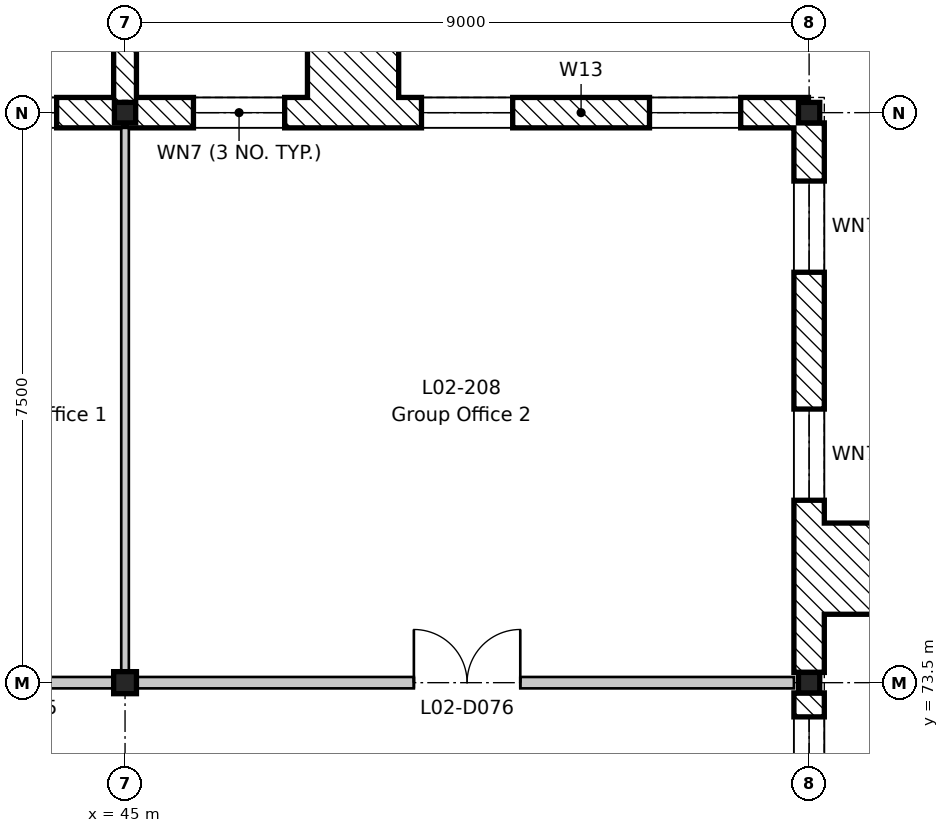
"""IFC4 building model, lengths in metres.
Left out: names, types, materials, properties, quantities, classifications, styles, units other than length and angle.
Written with IfcOpenShell. Run it as: python <this file> out.ifc"""

import sys

from ifc_helpers import new_model, si_unit, direction, frame, frame_2d, origin, origin_2d, place, context, subcontext, project, spatial, rectangle, i_section, extrude, element, fill, save


model = new_model("IFC4")
c1 = context("Model", 3, precision=1e-05, world=origin(), true_north=direction((0.0, 1.0)))
c2 = subcontext(c1, "Body", "Model", "MODEL_VIEW")
j1 = project(units=[si_unit("LENGTHUNIT", "METRE"), si_unit("PLANEANGLEUNIT", "RADIAN")], contexts=[c1])
p1 = place(None, origin())
s1 = spatial("IfcSite", under=j1, at=p1, CompositionType="ELEMENT")
p2 = place(p1, origin())
s2 = spatial("IfcBuilding", under=s1, at=p2, CompositionType="ELEMENT")
p3 = place(p2, frame((0.0, 0.0, 9.9)))
s3 = spatial("IfcBuildingStorey", under=s2, at=p3, CompositionType="ELEMENT", Elevation=9.9)
p4 = place(p3, frame((45.0, 73.5, -0.2), z_axis=(0.0, 0.0, 1.0), x_axis=(1.0, 0.0, 0.0)))
e1 = element("IfcColumn", 1, at=p4, inside=s3, PredefinedType="COLUMN", context=c2, shape_type="SweptSolid", body=[
    extrude(i_section(OverallWidth=0.3, OverallDepth=0.29, WebThickness=0.009, FlangeThickness=0.014, FilletRadius=0.027, at=origin_2d()), origin(), (0.0, 0.0, 1.0), 4.5),
])
for number, where, z_axis, x_axis in (
    (2, (45.0, 81.0, -0.2), (0.0, 0.0, 1.0), (1.0, 0.0, 0.0)),
    (3, (54.0, 73.5, -0.2), (0.0, 0.0, 1.0), (1.0, 0.0, 0.0)),
    (4, (54.0, 81.0, -0.2), (0.0, 0.0, 1.0), (1.0, 0.0, 0.0)),
):
    element("IfcColumn", number, at=place(p3, frame(where, z_axis=z_axis, x_axis=x_axis)), inside=s3, PredefinedType="COLUMN", context=c2, shape_type="SweptSolid", body=[
        extrude(i_section(OverallWidth=0.28, OverallDepth=0.27, WebThickness=0.008, FlangeThickness=0.013, FilletRadius=0.024, at=origin_2d()), origin(), (0.0, 0.0, 1.0), 4.5),
    ])
p5 = place(p3, frame((36.009, 81.0, 0.0), z_axis=(0.0, 0.0, 1.0), x_axis=(1.0, 0.0, 0.0)))
e5 = element("IfcWall", 5, at=p5, inside=s3, PredefinedType="STANDARD", context=c2, shape_type="SweptSolid", body=[
    extrude(rectangle(XDim=8.982, YDim=0.4, at=frame_2d((4.491, 0.0))), origin(), (0.0, 0.0, 1.0), 3.9),
])
p6 = place(p5, frame((3.591, 0.0, 0.0)))
e6 = element("IfcOpeningElement", 6, at=p6, cuts=e5, PredefinedType="OPENING", context=c2, shape_type="SweptSolid", body=[
    extrude(rectangle(XDim=1.8, YDim=2.4, at=frame_2d((0.9, 1.2))), frame((0.0, 0.21, 0.0), z_axis=(0.0, -1.0, 0.0), x_axis=(1.0, 0.0, 0.0)), (0.0, 0.0, 1.0), 0.42),
])
p7 = place(p5, frame((0.891, 0.0, 0.9)))
e7 = element("IfcOpeningElement", 7, at=p7, cuts=e5, PredefinedType="OPENING", context=c2, shape_type="SweptSolid", body=[
    extrude(rectangle(XDim=1.2, YDim=2.4, at=frame_2d((0.6, 1.2))), frame((0.0, 0.21, 0.0), z_axis=(0.0, -1.0, 0.0), x_axis=(1.0, 0.0, 0.0)), (0.0, 0.0, 1.0), 0.42),
])
p8 = place(p5, frame((6.891, 0.0, 0.9)))
e8 = element("IfcOpeningElement", 8, at=p8, cuts=e5, PredefinedType="OPENING", context=c2, shape_type="SweptSolid", body=[
    extrude(rectangle(XDim=1.2, YDim=2.4, at=frame_2d((0.6, 1.2))), frame((0.0, 0.21, 0.0), z_axis=(0.0, -1.0, 0.0), x_axis=(1.0, 0.0, 0.0)), (0.0, 0.0, 1.0), 0.42),
])
p9 = place(p3, frame((45.009, 81.0, 0.0), z_axis=(0.0, 0.0, 1.0), x_axis=(1.0, 0.0, 0.0)))
e9 = element("IfcWall", 9, at=p9, inside=s3, PredefinedType="STANDARD", context=c2, shape_type="SweptSolid", body=[
    extrude(rectangle(XDim=8.982, YDim=0.4, at=frame_2d((4.491, 0.0))), origin(), (0.0, 0.0, 1.0), 3.9),
])
p10 = place(p9, frame((0.891, 0.0, 0.9)))
e10 = element("IfcOpeningElement", 10, at=p10, cuts=e9, PredefinedType="OPENING", context=c2, shape_type="SweptSolid", body=[
    extrude(rectangle(XDim=1.2, YDim=2.4, at=frame_2d((0.6, 1.2))), frame((0.0, 0.21, 0.0), z_axis=(0.0, -1.0, 0.0), x_axis=(1.0, 0.0, 0.0)), (0.0, 0.0, 1.0), 0.42),
])
p11 = place(p9, frame((3.891, 0.0, 0.9)))
e11 = element("IfcOpeningElement", 11, at=p11, cuts=e9, PredefinedType="OPENING", context=c2, shape_type="SweptSolid", body=[
    extrude(rectangle(XDim=1.2, YDim=2.4, at=frame_2d((0.6, 1.2))), frame((0.0, 0.21, 0.0), z_axis=(0.0, -1.0, 0.0), x_axis=(1.0, 0.0, 0.0)), (0.0, 0.0, 1.0), 0.42),
])
p12 = place(p9, frame((6.891, 0.0, 0.9)))
e12 = element("IfcOpeningElement", 12, at=p12, cuts=e9, PredefinedType="OPENING", context=c2, shape_type="SweptSolid", body=[
    extrude(rectangle(XDim=1.2, YDim=2.4, at=frame_2d((0.6, 1.2))), frame((0.0, 0.21, 0.0), z_axis=(0.0, -1.0, 0.0), x_axis=(1.0, 0.0, 0.0)), (0.0, 0.0, 1.0), 0.42),
])
p13 = place(p3, frame((54.0, 73.365, 0.0), z_axis=(0.0, 0.0, 1.0), x_axis=(0.0, -1.0, 0.0)))
e13 = element("IfcWall", 13, at=p13, inside=s3, PredefinedType="STANDARD", context=c2, shape_type="SweptSolid", body=[
    extrude(rectangle(XDim=2.73, YDim=0.4, at=frame_2d((1.365, 0.0))), origin(), (0.0, 0.0, 1.0), 4.1),
])
p14 = place(p13, frame((0.315, 0.0, 0.9)))
e14 = element("IfcOpeningElement", 14, at=p14, cuts=e13, PredefinedType="OPENING", context=c2, shape_type="SweptSolid", body=[
    extrude(rectangle(XDim=2.1, YDim=2.1, at=frame_2d((1.05, 1.05))), frame((0.0, 0.21, 0.0), z_axis=(0.0, -1.0, 0.0), x_axis=(1.0, 0.0, 0.0)), (0.0, 0.0, 1.0), 0.42),
])
p15 = place(p3, frame((54.0, 80.865, 0.0), z_axis=(0.0, 0.0, 1.0), x_axis=(0.0, -1.0, 0.0)))
e15 = element("IfcWall", 15, at=p15, inside=s3, PredefinedType="STANDARD", context=c2, shape_type="SweptSolid", body=[
    extrude(rectangle(XDim=7.23, YDim=0.4, at=frame_2d((3.615, 0.0))), origin(), (0.0, 0.0, 1.0), 3.97),
])
p16 = place(p15, frame((3.765, 0.0, 0.9)))
e16 = element("IfcOpeningElement", 16, at=p16, cuts=e15, PredefinedType="OPENING", context=c2, shape_type="SweptSolid", body=[
    extrude(rectangle(XDim=1.2, YDim=2.4, at=frame_2d((0.6, 1.2))), frame((0.0, 0.21, 0.0), z_axis=(0.0, -1.0, 0.0), x_axis=(1.0, 0.0, 0.0)), (0.0, 0.0, 1.0), 0.42),
])
p17 = place(p15, frame((0.765, 0.0, 0.9)))
e17 = element("IfcOpeningElement", 17, at=p17, cuts=e15, PredefinedType="OPENING", context=c2, shape_type="SweptSolid", body=[
    extrude(rectangle(XDim=1.2, YDim=2.4, at=frame_2d((0.6, 1.2))), frame((0.0, 0.21, 0.0), z_axis=(0.0, -1.0, 0.0), x_axis=(1.0, 0.0, 0.0)), (0.0, 0.0, 1.0), 0.42),
])
for number, where, z_axis, x_axis in (
    (18, (47.4, 81.8, 0.0), (0.0, 0.0, 1.0), (1.0, 0.0, 0.0)),
    (19, (54.8, 74.4, 0.0), (0.0, 0.0, 1.0), (0.0, 1.0, 0.0)),
):
    element("IfcWall", number, at=place(p3, frame(where, z_axis=z_axis, x_axis=x_axis)), inside=s3, PredefinedType="STANDARD", context=c2, shape_type="SweptSolid", body=[
        extrude(rectangle(XDim=1.2, YDim=1.2, at=frame_2d((0.6, 0.0))), origin(), (0.0, 0.0, 1.0), 4.5),
    ])
p18 = place(p3, frame((45.0, 81.135, 0.0), z_axis=(0.0, 0.0, 1.0), x_axis=(0.0, 1.0, 0.0)))
e20 = element("IfcWall", 20, at=p18, inside=s3, PredefinedType="STANDARD", context=c2, shape_type="SweptSolid", body=[
    extrude(rectangle(XDim=2.865, YDim=0.3, at=frame_2d((1.433, 0.0))), origin(), (0.0, 0.0, 1.0), 3.97),
])
p19 = place(p3, frame((45.0, 73.575, 0.0), z_axis=(0.0, 0.0, 1.0), x_axis=(0.0, 1.0, 0.0)))
e21 = element("IfcWall", 21, at=p19, inside=s3, PredefinedType="PARTITIONING", context=c2, shape_type="SweptSolid", body=[
    extrude(rectangle(XDim=7.225, YDim=0.1, at=frame_2d((3.613, 0.0))), origin(), (0.0, 0.0, 1.0), 3.95),
])
p20 = place(p3, frame((18.0, 73.5, 0.0), z_axis=(0.0, 0.0, 1.0), x_axis=(1.0, 0.0, 0.0)))
e22 = element("IfcWall", 22, at=p20, inside=s3, PredefinedType="PARTITIONING", context=c2, shape_type="SweptSolid", body=[
    extrude(rectangle(XDim=35.8, YDim=0.15, at=frame_2d((17.9, 0.0))), origin(), (0.0, 0.0, 1.0), 3.78),
])
p21 = place(p20, frame((7.05, 0.0, 0.0)))
e23 = element("IfcOpeningElement", 23, at=p21, cuts=e22, PredefinedType="OPENING", context=c2, shape_type="SweptSolid", body=[
    extrude(rectangle(XDim=1.4, YDim=2.1, at=frame_2d((0.7, 1.05))), frame((0.0, 0.085, 0.0), z_axis=(0.0, -1.0, 0.0), x_axis=(1.0, 0.0, 0.0)), (0.0, 0.0, 1.0), 0.17),
])
p22 = place(p20, frame((10.0, 0.0, 0.0)))
e24 = element("IfcOpeningElement", 24, at=p22, cuts=e22, PredefinedType="OPENING", context=c2, shape_type="SweptSolid", body=[
    extrude(rectangle(XDim=1.0, YDim=2.1, at=frame_2d((0.5, 1.05))), frame((0.0, 0.085, 0.0), z_axis=(0.0, -1.0, 0.0), x_axis=(1.0, 0.0, 0.0)), (0.0, 0.0, 1.0), 0.17),
])
p23 = place(p20, frame((14.5, 0.0, 0.0)))
e25 = element("IfcOpeningElement", 25, at=p23, cuts=e22, PredefinedType="OPENING", context=c2, shape_type="SweptSolid", body=[
    extrude(rectangle(XDim=1.0, YDim=2.1, at=frame_2d((0.5, 1.05))), frame((0.0, 0.085, 0.0), z_axis=(0.0, -1.0, 0.0), x_axis=(1.0, 0.0, 0.0)), (0.0, 0.0, 1.0), 0.17),
])
p24 = place(p20, frame((20.5, 0.0, 0.0)))
e26 = element("IfcOpeningElement", 26, at=p24, cuts=e22, PredefinedType="OPENING", context=c2, shape_type="SweptSolid", body=[
    extrude(rectangle(XDim=1.0, YDim=2.1, at=frame_2d((0.5, 1.05))), frame((0.0, 0.085, 0.0), z_axis=(0.0, -1.0, 0.0), x_axis=(1.0, 0.0, 0.0)), (0.0, 0.0, 1.0), 0.17),
])
p25 = place(p20, frame((25.0, 0.0, 0.0)))
e27 = element("IfcOpeningElement", 27, at=p25, cuts=e22, PredefinedType="OPENING", context=c2, shape_type="SweptSolid", body=[
    extrude(rectangle(XDim=1.0, YDim=2.1, at=frame_2d((0.5, 1.05))), frame((0.0, 0.085, 0.0), z_axis=(0.0, -1.0, 0.0), x_axis=(1.0, 0.0, 0.0)), (0.0, 0.0, 1.0), 0.17),
])
p26 = place(p20, frame((30.8, 0.0, 0.0)))
e28 = element("IfcOpeningElement", 28, at=p26, cuts=e22, PredefinedType="OPENING", context=c2, shape_type="SweptSolid", body=[
    extrude(rectangle(XDim=1.4, YDim=2.1, at=frame_2d((0.7, 1.05))), frame((0.0, 0.085, 0.0), z_axis=(0.0, -1.0, 0.0), x_axis=(1.0, 0.0, 0.0)), (0.0, 0.0, 1.0), 0.17),
])
p27 = place(p8, origin())
e29 = element("IfcWindow", 29, at=p27, inside=s3, PartitioningType="SINGLE_PANEL", PredefinedType="WINDOW", context=c2, shape_type="SweptSolid", body=[
    extrude(rectangle(XDim=1.2, YDim=2.4, at=frame_2d((0.6, 1.2))), frame((0.0, -0.12, 0.0), z_axis=(0.0, -1.0, 0.0), x_axis=(1.0, 0.0, 0.0)), (0.0, 0.0, 1.0), 0.06),
])
fill(e8, e29)
p28 = place(p10, origin())
e30 = element("IfcWindow", 30, at=p28, inside=s3, PartitioningType="SINGLE_PANEL", PredefinedType="WINDOW", context=c2, shape_type="SweptSolid", body=[
    extrude(rectangle(XDim=1.2, YDim=2.4, at=frame_2d((0.6, 1.2))), frame((0.0, -0.12, 0.0), z_axis=(0.0, -1.0, 0.0), x_axis=(1.0, 0.0, 0.0)), (0.0, 0.0, 1.0), 0.06),
])
fill(e10, e30)
p29 = place(p11, origin())
e31 = element("IfcWindow", 31, at=p29, inside=s3, PartitioningType="SINGLE_PANEL", PredefinedType="WINDOW", context=c2, shape_type="SweptSolid", body=[
    extrude(rectangle(XDim=1.2, YDim=2.4, at=frame_2d((0.6, 1.2))), frame((0.0, -0.12, 0.0), z_axis=(0.0, -1.0, 0.0), x_axis=(1.0, 0.0, 0.0)), (0.0, 0.0, 1.0), 0.06),
])
fill(e11, e31)
p30 = place(p12, origin())
e32 = element("IfcWindow", 32, at=p30, inside=s3, PartitioningType="SINGLE_PANEL", PredefinedType="WINDOW", context=c2, shape_type="SweptSolid", body=[
    extrude(rectangle(XDim=1.2, YDim=2.4, at=frame_2d((0.6, 1.2))), frame((0.0, -0.12, 0.0), z_axis=(0.0, -1.0, 0.0), x_axis=(1.0, 0.0, 0.0)), (0.0, 0.0, 1.0), 0.06),
])
fill(e12, e32)
p31 = place(p14, origin())
e33 = element("IfcWindow", 33, at=p31, inside=s3, PartitioningType="SINGLE_PANEL", PredefinedType="WINDOW", context=c2, shape_type="SweptSolid", body=[
    extrude(rectangle(XDim=2.1, YDim=2.1, at=frame_2d((1.05, 1.05))), frame((0.0, -0.12, 0.0), z_axis=(0.0, -1.0, 0.0), x_axis=(1.0, 0.0, 0.0)), (0.0, 0.0, 1.0), 0.06),
])
fill(e14, e33)
p32 = place(p16, origin())
e34 = element("IfcWindow", 34, at=p32, inside=s3, PartitioningType="SINGLE_PANEL", PredefinedType="WINDOW", context=c2, shape_type="SweptSolid", body=[
    extrude(rectangle(XDim=1.2, YDim=2.4, at=frame_2d((0.6, 1.2))), frame((0.0, -0.12, 0.0), z_axis=(0.0, -1.0, 0.0), x_axis=(1.0, 0.0, 0.0)), (0.0, 0.0, 1.0), 0.06),
])
fill(e16, e34)
p33 = place(p17, origin())
e35 = element("IfcWindow", 35, at=p33, inside=s3, PartitioningType="SINGLE_PANEL", PredefinedType="WINDOW", context=c2, shape_type="SweptSolid", body=[
    extrude(rectangle(XDim=1.2, YDim=2.4, at=frame_2d((0.6, 1.2))), frame((0.0, -0.12, 0.0), z_axis=(0.0, -1.0, 0.0), x_axis=(1.0, 0.0, 0.0)), (0.0, 0.0, 1.0), 0.06),
])
fill(e17, e35)
p34 = place(p26, origin())
e36 = element("IfcDoor", 36, at=p34, inside=s3, OperationType="DOUBLE_DOOR_SINGLE_SWING", PredefinedType="DOOR", context=c2, shape_type="SweptSolid", body=[
    extrude(rectangle(XDim=1.4, YDim=2.1, at=frame_2d((0.7, 1.05))), frame((0.0, 0.025, 0.0), z_axis=(0.0, -1.0, 0.0), x_axis=(1.0, 0.0, 0.0)), (0.0, 0.0, 1.0), 0.05),
])
fill(e28, e36)
save(model, sys.argv[1])
